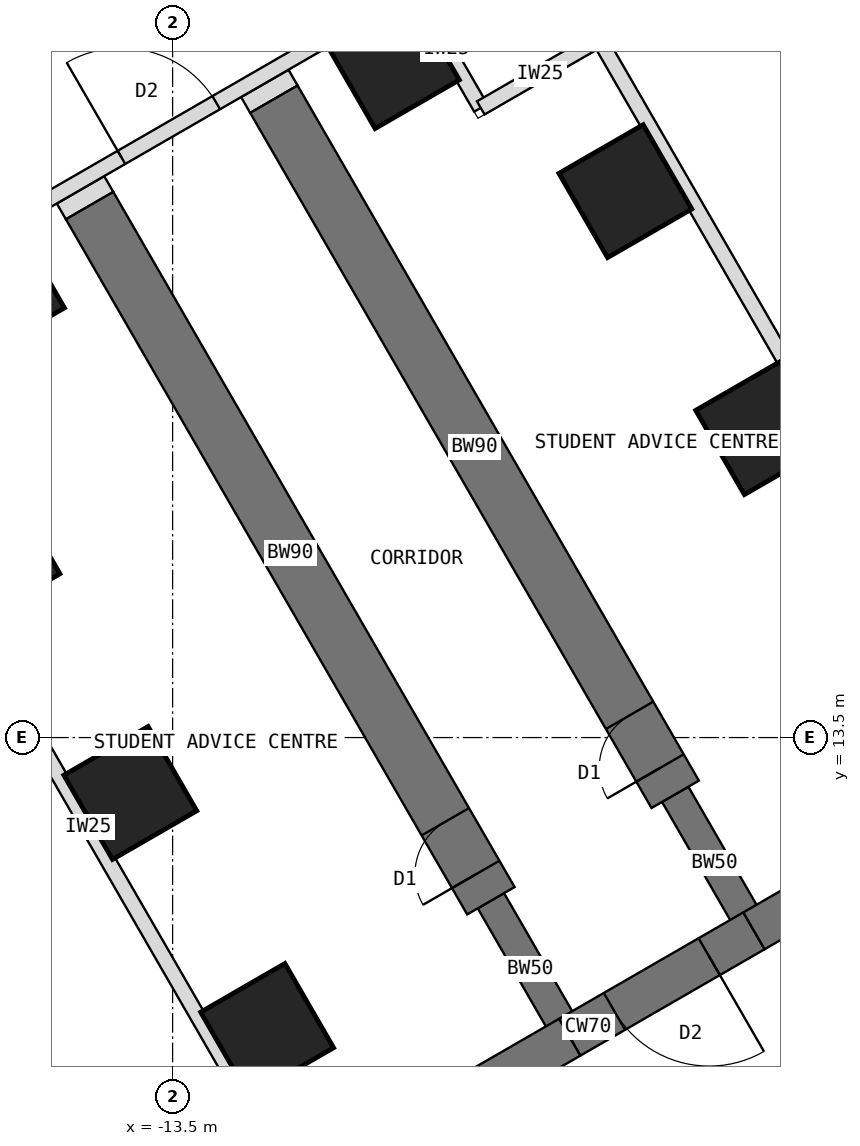
"""IFC4 building model, lengths in metres.
Left out: names, types, materials, properties, quantities, classifications, styles, units other than length and angle.
Written with IfcOpenShell. Run it as: python <this file> out.ifc"""

import sys

from ifc_helpers import new_model, si_unit, direction, frame, frame_2d, origin, origin_2d, place, context, subcontext, project, spatial, rectangle, extrude, element, fill, save


model = new_model("IFC4")
c1 = context("Model", 3, precision=1e-05, world=origin(), true_north=direction((0.0, 1.0)))
c2 = subcontext(c1, "Body", "Model", "MODEL_VIEW")
j1 = project(units=[si_unit("LENGTHUNIT", "METRE"), si_unit("PLANEANGLEUNIT", "RADIAN")], contexts=[c1])
p1 = place(None, origin())
s1 = spatial("IfcSite", under=j1, at=p1, CompositionType="ELEMENT")
p2 = place(p1, origin())
s2 = spatial("IfcBuilding", under=s1, at=p2, CompositionType="ELEMENT")
p3 = place(p2, origin())
s3 = spatial("IfcBuildingStorey", under=s2, at=p3, CompositionType="ELEMENT", Elevation=0.0)
p4 = place(p3, frame((0.0, 12.596, 0.0), z_axis=(0.0, 0.0, 1.0), x_axis=(-0.866011268655, -0.500024481964, 0.0)))
e1 = element("IfcWall", 1, at=p4, inside=s3, PredefinedType="SHEAR", context=c2, shape_type="SweptSolid", body=[
    extrude(rectangle(XDim=4.548, YDim=0.7, at=frame_2d((2.274, 0.0))), origin(), (0.0, 0.0, 1.0), 5.5),
])
p5 = place(p3, frame((-3.939, 10.322, 0.0), z_axis=(0.0, 0.0, 1.0), x_axis=(-0.866019471182, -0.500010275428, 0.0)))
e2 = element("IfcWall", 2, at=p5, inside=s3, PredefinedType="SHEAR", context=c2, shape_type="SweptSolid", body=[
    extrude(rectangle(XDim=3.5, YDim=0.7, at=frame_2d((1.75, 0.0))), origin(), (0.0, 0.0, 1.0), 5.5),
])
p6 = place(p5, frame((0.85, 0.0, 0.0)))
e3 = element("IfcOpeningElement", 3, at=p6, cuts=e2, PredefinedType="OPENING", context=c2, shape_type="SweptSolid", body=[
    extrude(rectangle(XDim=1.8, YDim=2.1, at=frame_2d((0.9, 1.05))), frame((0.0, 0.36, 0.0), z_axis=(0.0, -1.0, 0.0), x_axis=(1.0, 0.0, 0.0)), (0.0, 0.0, 1.0), 0.72),
])
p7 = place(p3, frame((-6.97, 8.572, 0.0), z_axis=(0.0, 0.0, 1.0), x_axis=(-0.866034513004, -0.499984222037, 0.0)))
e4 = element("IfcWall", 4, at=p7, inside=s3, PredefinedType="SHEAR", context=c2, shape_type="SweptSolid", body=[
    extrude(rectangle(XDim=4.548, YDim=0.7, at=frame_2d((2.274, 0.0))), origin(), (0.0, 0.0, 1.0), 5.5),
])
p8 = place(p3, frame((-6.97, 8.572, 0.0), z_axis=(0.0, 0.0, 1.0), x_axis=(-0.499988811324, 0.866031863473, 0.0)))
e5 = element("IfcWall", 5, at=p8, inside=s3, PredefinedType="SHEAR", context=c2, shape_type="SweptSolid", body=[
    extrude(rectangle(XDim=2.592, YDim=0.5, at=frame_2d((1.296, 0.0))), origin(), (0.0, 0.0, 1.0), 5.5),
])
p9 = place(p3, frame((-8.266, 10.816, 0.0), z_axis=(0.0, 0.0, 1.0), x_axis=(-0.499996231654, 0.866027579429, 0.0)))
e6 = element("IfcWall", 6, at=p9, inside=s3, PredefinedType="SHEAR", context=c2, shape_type="SweptSolid", body=[
    extrude(rectangle(XDim=13.2, YDim=0.9, at=frame_2d((6.6, 0.0))), origin(), (0.0, 0.0, 1.0), 5.5),
])
p10 = place(p9, frame((0.5, 0.0, 0.0)))
e7 = element("IfcOpeningElement", 7, at=p10, cuts=e6, PredefinedType="OPENING", context=c2, shape_type="SweptSolid", body=[
    extrude(rectangle(XDim=1.0, YDim=2.1, at=frame_2d((0.5, 1.05))), frame((0.0, 0.46, 0.0), z_axis=(0.0, -1.0, 0.0), x_axis=(1.0, 0.0, 0.0)), (0.0, 0.0, 1.0), 0.92),
])
p11 = place(p3, frame((-3.939, 10.322, 0.0), z_axis=(0.0, 0.0, 1.0), x_axis=(-0.499918158782, 0.866072649678, 0.0)))
e8 = element("IfcWall", 8, at=p11, inside=s3, PredefinedType="SHEAR", context=c2, shape_type="SweptSolid", body=[
    extrude(rectangle(XDim=2.592, YDim=0.5, at=frame_2d((1.296, 0.0))), origin(), (0.0, 0.0, 1.0), 5.5),
])
p12 = place(p3, frame((-5.234, 12.566, 0.0), z_axis=(0.0, 0.0, 1.0), x_axis=(-0.500010103361, 0.866019570528, 0.0)))
e9 = element("IfcWall", 9, at=p12, inside=s3, PredefinedType="SHEAR", context=c2, shape_type="SweptSolid", body=[
    extrude(rectangle(XDim=13.2, YDim=0.9, at=frame_2d((6.6, 0.0))), origin(), (0.0, 0.0, 1.0), 5.5),
])
p13 = place(p12, frame((0.5, 0.0, 0.0)))
e10 = element("IfcOpeningElement", 10, at=p13, cuts=e9, PredefinedType="OPENING", context=c2, shape_type="SweptSolid", body=[
    extrude(rectangle(XDim=1.0, YDim=2.1, at=frame_2d((0.5, 1.05))), frame((0.0, 0.46, 0.0), z_axis=(0.0, -1.0, 0.0), x_axis=(1.0, 0.0, 0.0)), (0.0, 0.0, 1.0), 0.92),
])
for number, where, z_axis, x_axis in (
    (11, (-11.946, 8.691, 0.0), (0.0, 0.0, 1.0), (0.866, 0.5, 0.0)),
    (12, (-14.196, 12.588, 0.0), (0.0, 0.0, 1.0), (0.866, 0.5, 0.0)),
    (13, (-3.804, 18.588, 0.0), (0.0, 0.0, 1.0), (0.866, 0.5, 0.0)),
    (14, (-16.446, 16.486, 0.0), (0.0, 0.0, 1.0), (0.866, 0.5, 0.0)),
    (15, (-6.054, 22.486, 0.0), (0.0, 0.0, 1.0), (0.866, 0.5, 0.0)),
    (16, (-16.373, 20.858, 0.0), (0.0, 0.0, 1.0), (0.866, 0.5, 0.0)),
    (17, (-9.877, 24.608, 0.0), (0.0, 0.0, 1.0), (0.866, 0.5, 0.0)),
):
    element("IfcColumn", number, at=place(p3, frame(where, z_axis=z_axis, x_axis=x_axis)), inside=s3, PredefinedType="COLUMN", context=c2, shape_type="SweptSolid", body=[
        extrude(rectangle(XDim=1.6, YDim=1.6, at=origin_2d()), origin(), (0.0, 0.0, 1.0), 5.5),
    ])
p14 = place(p3, frame((-14.865, 22.248, 0.0), z_axis=(0.0, 0.0, 1.0), x_axis=(-0.500426713919, 0.865778900179, 0.0)))
e18 = element("IfcWall", 18, at=p14, inside=s3, PredefinedType="PARTITIONING", context=c2, shape_type="SweptSolid", body=[
    extrude(rectangle(XDim=0.3, YDim=0.9, at=frame_2d((0.15, 0.0))), origin(), (0.0, 0.0, 1.0), 5.15),
])
p15 = place(p3, frame((-11.834, 23.998, 0.0), z_axis=(0.0, 0.0, 1.0), x_axis=(-0.499816412211, 0.866131372301, 0.0)))
e19 = element("IfcWall", 19, at=p15, inside=s3, PredefinedType="PARTITIONING", context=c2, shape_type="SweptSolid", body=[
    extrude(rectangle(XDim=0.3, YDim=0.9, at=frame_2d((0.15, 0.0))), origin(), (0.0, 0.0, 1.0), 5.15),
])
p16 = place(p3, frame((-11.383, 5.967, 0.0), z_axis=(0.0, 0.0, 1.0), x_axis=(-0.499996367808, 0.866027500821, 0.0)))
e20 = element("IfcWall", 20, at=p16, inside=s3, PredefinedType="STANDARD", context=c2, shape_type="SweptSolid", body=[
    extrude(rectangle(XDim=14.016, YDim=0.25, at=frame_2d((7.008, 0.0))), origin(), (0.0, 0.0, 1.0), 5.15),
])
p17 = place(p3, frame((-17.568, 21.178, 0.0), z_axis=(0.0, 0.0, 1.0), x_axis=(0.866025598446, 0.499999662836, 0.0)))
e21 = element("IfcWall", 21, at=p17, inside=s3, PredefinedType="STANDARD", context=c2, shape_type="SweptSolid", body=[
    extrude(rectangle(XDim=9.25, YDim=0.25, at=frame_2d((4.625, 0.0))), origin(), (0.0, 0.0, 1.0), 5.15),
])
p18 = place(p17, frame((3.725, 0.0, 0.0)))
e22 = element("IfcOpeningElement", 22, at=p18, cuts=e21, PredefinedType="OPENING", context=c2, shape_type="SweptSolid", body=[
    extrude(rectangle(XDim=1.8, YDim=2.1, at=frame_2d((0.9, 1.05))), frame((0.0, 0.135, 0.0), z_axis=(0.0, -1.0, 0.0), x_axis=(1.0, 0.0, 0.0)), (0.0, 0.0, 1.0), 0.27),
])
for number, where, z_axis, x_axis in (
    (23, (-9.557, 25.803, 0.0), (0.0, 0.0, 1.0), (0.5, -0.866, 0.0)),
    (24, (-8.432, 23.855, 0.0), (0.0, 0.0, 1.0), (0.866, 0.5, 0.0)),
):
    element("IfcWall", number, at=place(p3, frame(where, z_axis=z_axis, x_axis=x_axis)), inside=s3, PredefinedType="STANDARD", context=c2, shape_type="SweptSolid", body=[
        extrude(rectangle(XDim=2.25, YDim=0.25, at=frame_2d((1.125, 0.0))), origin(), (0.0, 0.0, 1.0), 5.15),
    ])
p19 = place(p3, frame((-6.484, 24.98, 0.0), z_axis=(0.0, 0.0, 1.0), x_axis=(0.499996367808, -0.866027500821, 0.0)))
e25 = element("IfcWall", 25, at=p19, inside=s3, PredefinedType="STANDARD", context=c2, shape_type="SweptSolid", body=[
    extrude(rectangle(XDim=14.016, YDim=0.25, at=frame_2d((7.008, 0.0))), origin(), (0.0, 0.0, 1.0), 5.15),
])
p20 = place(p6, origin())
e26 = element("IfcDoor", 26, at=p20, inside=s3, OperationType="DOUBLE_DOOR_DOUBLE_SWING", PredefinedType="DOOR", context=c2, shape_type="SweptSolid", body=[
    extrude(rectangle(XDim=1.72, YDim=2.06, at=frame_2d((0.9, 1.03))), frame((0.0, 0.025, 0.0), z_axis=(0.0, -1.0, 0.0), x_axis=(1.0, 0.0, 0.0)), (0.0, 0.0, 1.0), 0.05),
    extrude(rectangle(XDim=0.04, YDim=2.1, at=frame_2d((0.02, 1.05))), frame((0.0, 0.35, 0.0), z_axis=(0.0, -1.0, 0.0), x_axis=(1.0, 0.0, 0.0)), (0.0, 0.0, 1.0), 0.699),
    extrude(rectangle(XDim=0.04, YDim=2.1, at=frame_2d((1.78, 1.05))), frame((0.0, 0.35, 0.0), z_axis=(0.0, -1.0, 0.0), x_axis=(1.0, 0.0, 0.0)), (0.0, 0.0, 1.0), 0.699),
    extrude(rectangle(XDim=1.72, YDim=0.04, at=frame_2d((0.9, 2.08))), frame((0.0, 0.35, 0.0), z_axis=(0.0, -1.0, 0.0), x_axis=(1.0, 0.0, 0.0)), (0.0, 0.0, 1.0), 0.699),
])
fill(e3, e26)
p21 = place(p10, origin())
e27 = element("IfcDoor", 27, at=p21, inside=s3, OperationType="SINGLE_SWING_LEFT", PredefinedType="DOOR", context=c2, shape_type="SweptSolid", body=[
    extrude(rectangle(XDim=0.92, YDim=2.06, at=frame_2d((0.5, 1.03))), frame((0.0, 0.025, 0.0), z_axis=(0.0, -1.0, 0.0), x_axis=(1.0, 0.0, 0.0)), (0.0, 0.0, 1.0), 0.05),
    extrude(rectangle(XDim=0.04, YDim=2.1, at=frame_2d((0.02, 1.05))), frame((0.0, 0.45, 0.0), z_axis=(0.0, -1.0, 0.0), x_axis=(1.0, 0.0, 0.0)), (0.0, 0.0, 1.0), 0.899),
    extrude(rectangle(XDim=0.04, YDim=2.1, at=frame_2d((0.98, 1.05))), frame((0.0, 0.45, 0.0), z_axis=(0.0, -1.0, 0.0), x_axis=(1.0, 0.0, 0.0)), (0.0, 0.0, 1.0), 0.899),
    extrude(rectangle(XDim=0.92, YDim=0.04, at=frame_2d((0.5, 2.08))), frame((0.0, 0.45, 0.0), z_axis=(0.0, -1.0, 0.0), x_axis=(1.0, 0.0, 0.0)), (0.0, 0.0, 1.0), 0.899),
])
fill(e7, e27)
p22 = place(p13, origin())
e28 = element("IfcDoor", 28, at=p22, inside=s3, OperationType="SINGLE_SWING_LEFT", PredefinedType="DOOR", context=c2, shape_type="SweptSolid", body=[
    extrude(rectangle(XDim=0.92, YDim=2.06, at=frame_2d((0.5, 1.03))), frame((0.0, 0.025, 0.0), z_axis=(0.0, -1.0, 0.0), x_axis=(1.0, 0.0, 0.0)), (0.0, 0.0, 1.0), 0.05),
    extrude(rectangle(XDim=0.04, YDim=2.1, at=frame_2d((0.02, 1.05))), frame((0.0, 0.45, 0.0), z_axis=(0.0, -1.0, 0.0), x_axis=(1.0, 0.0, 0.0)), (0.0, 0.0, 1.0), 0.899),
    extrude(rectangle(XDim=0.04, YDim=2.1, at=frame_2d((0.98, 1.05))), frame((0.0, 0.45, 0.0), z_axis=(0.0, -1.0, 0.0), x_axis=(1.0, 0.0, 0.0)), (0.0, 0.0, 1.0), 0.899),
    extrude(rectangle(XDim=0.92, YDim=0.04, at=frame_2d((0.5, 2.08))), frame((0.0, 0.45, 0.0), z_axis=(0.0, -1.0, 0.0), x_axis=(1.0, 0.0, 0.0)), (0.0, 0.0, 1.0), 0.899),
])
fill(e10, e28)
p23 = place(p18, origin())
e29 = element("IfcDoor", 29, at=p23, inside=s3, OperationType="DOUBLE_DOOR_DOUBLE_SWING", PredefinedType="DOOR", context=c2, shape_type="SweptSolid", body=[
    extrude(rectangle(XDim=1.8, YDim=2.1, at=frame_2d((0.9, 1.05))), frame((0.0, 0.025, 0.0), z_axis=(0.0, -1.0, 0.0), x_axis=(1.0, 0.0, 0.0)), (0.0, 0.0, 1.0), 0.05),
])
fill(e22, e29)
save(model, sys.argv[1])
